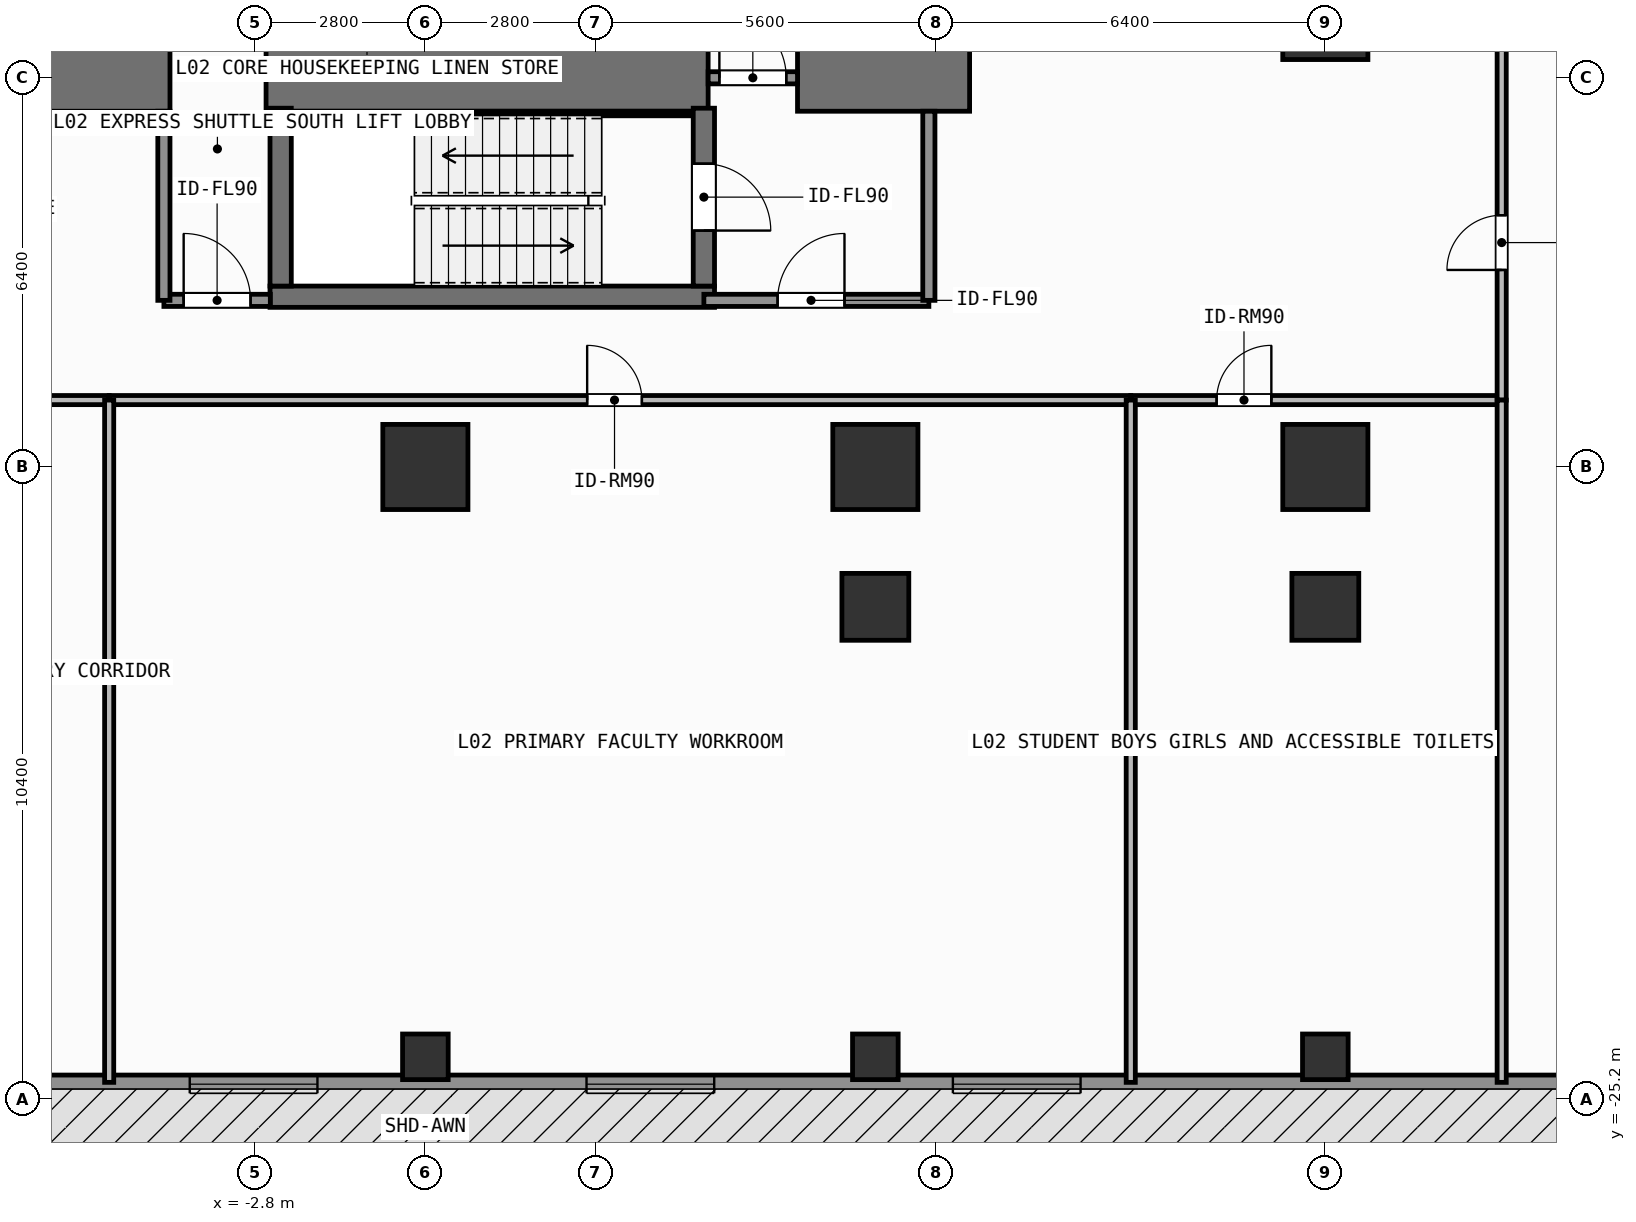
"""IFC4 building model, lengths in metres.
Left out: names, types, materials, properties, quantities, classifications, styles, units other than length and angle.
Written with IfcOpenShell. Run it as: python <this file> out.ifc"""

import sys

from ifc_helpers import new_model, si_unit, direction, frame, frame_2d, origin, origin_2d, place, context, subcontext, project, spatial, rectangle, extrude, element, fill, save


model = new_model("IFC4")
c1 = context("Model", 3, precision=1e-05, world=origin(), true_north=direction((0.0, 1.0)))
c2 = subcontext(c1, "Body", "Model", "MODEL_VIEW")
j1 = project(units=[si_unit("LENGTHUNIT", "METRE"), si_unit("PLANEANGLEUNIT", "RADIAN")], contexts=[c1])
p1 = place(None, origin())
s1 = spatial("IfcSite", under=j1, at=p1, CompositionType="ELEMENT")
p2 = place(p1, origin())
s2 = spatial("IfcBuilding", under=s1, at=p2, CompositionType="ELEMENT")
p3 = place(p2, frame((0.0, 0.0, 4.8)))
s3 = spatial("IfcBuildingStorey", under=s2, at=p3, CompositionType="ELEMENT", Elevation=4.8)
p4 = place(p3, frame((-7.55, -8.4, 0.0), z_axis=(0.0, 0.0, 1.0), x_axis=(1.0, 0.0, 0.0)))
e1 = element("IfcWall", 1, at=p4, inside=s3, PredefinedType="SHEAR", context=c2, shape_type="SweptSolid", body=[
    extrude(rectangle(XDim=3.35, YDim=1.1, at=frame_2d((1.675, 0.0))), origin(), (0.0, 0.0, 1.0), 4.2),
])
p5 = place(p3, frame((-2.62, -8.4, 0.0), z_axis=(0.0, 0.0, 1.0), x_axis=(1.0, 0.0, 0.0)))
e2 = element("IfcWall", 2, at=p5, inside=s3, PredefinedType="SHEAR", context=c2, shape_type="SweptSolid", body=[
    extrude(rectangle(XDim=7.27, YDim=1.1, at=frame_2d((3.635, 0.0))), origin(), (0.0, 0.0, 1.0), 4.2),
])
p6 = place(p3, frame((6.12, -8.4, 0.0), z_axis=(0.0, 0.0, 1.0), x_axis=(1.0, 0.0, 0.0)))
e3 = element("IfcWall", 3, at=p6, inside=s3, PredefinedType="SHEAR", context=c2, shape_type="SweptSolid", body=[
    extrude(rectangle(XDim=2.83, YDim=1.1, at=frame_2d((1.415, 0.0))), origin(), (0.0, 0.0, 1.0), 4.2),
])
p7 = place(p3, frame((-2.555, -12.0, 0.0), z_axis=(0.0, 0.0, 1.0), x_axis=(1.0, 0.0, 0.0)))
e4 = element("IfcWall", 4, at=p7, inside=s3, PredefinedType="SHEAR", context=c2, shape_type="SweptSolid", body=[
    extrude(rectangle(XDim=7.31, YDim=0.35, at=frame_2d((3.655, 0.0))), origin(), (0.0, 0.0, 1.0), 4.2),
])
p8 = place(p3, frame((-2.2, -8.988, 0.0), z_axis=(0.0, 0.0, 1.0), x_axis=(1.0, 0.0, 0.0)))
e5 = element("IfcWall", 5, at=p8, inside=s3, PredefinedType="SHEAR", context=c2, shape_type="SweptSolid", body=[
    extrude(rectangle(XDim=6.6, YDim=0.075, at=frame_2d((3.3, 0.0))), origin(), (0.0, 0.0, 1.0), 4.2),
])
p9 = place(p3, frame((-2.38, -11.825, 0.0), z_axis=(0.0, 0.0, 1.0), x_axis=(0.0, 1.0, 0.0)))
e6 = element("IfcWall", 6, at=p9, inside=s3, PredefinedType="SHEAR", context=c2, shape_type="SweptSolid", body=[
    extrude(rectangle(XDim=2.925, YDim=0.35, at=frame_2d((1.462, 0.0))), origin(), (0.0, 0.0, 1.0), 4.2),
])
p10 = place(p3, frame((4.58, -8.9, 0.0), z_axis=(0.0, 0.0, 1.0), x_axis=(0.0, -1.0, 0.0)))
e7 = element("IfcWall", 7, at=p10, inside=s3, PredefinedType="SHEAR", context=c2, shape_type="SweptSolid", body=[
    extrude(rectangle(XDim=2.925, YDim=0.35, at=frame_2d((1.462, 0.0))), origin(), (0.0, 0.0, 1.0), 4.2),
])
p11 = place(p10, frame((0.913, 0.0, 0.0)))
e8 = element("IfcOpeningElement", 8, at=p11, cuts=e7, PredefinedType="OPENING", context=c2, shape_type="SweptSolid", body=[
    extrude(rectangle(XDim=1.1, YDim=2.15, at=frame_2d((0.55, 1.075))), frame((0.0, 0.185, 0.0), z_axis=(0.0, -1.0, 0.0), x_axis=(1.0, 0.0, 0.0)), (0.0, 0.0, 1.0), 0.37),
])
for number, where, z_axis, x_axis in (
    (9, (0.0, -14.8, 0.0), (0.0, 0.0, 1.0), (1.0, 0.0, 0.0)),
    (10, (7.4, -14.8, 0.0), (0.0, 0.0, 1.0), (1.0, 0.0, 0.0)),
    (11, (14.8, -14.8, 0.0), (0.0, 0.0, 1.0), (1.0, 0.0, 0.0)),
    (12, (14.8, -7.4, 0.0), (0.0, 0.0, 1.0), (1.0, 0.0, 0.0)),
):
    element("IfcColumn", number, at=place(p3, frame(where, z_axis=z_axis, x_axis=x_axis)), inside=s3, PredefinedType="COLUMN", context=c2, shape_type="SweptSolid", body=[
        extrude(rectangle(XDim=1.4, YDim=1.4, at=origin_2d()), origin(), (0.0, 0.0, 1.0), 4.2),
    ])
for number, where, z_axis, x_axis in (
    (13, (7.4, -17.1, 0.0), (0.0, 0.0, 1.0), (1.0, 0.0, 0.0)),
    (14, (14.8, -17.1, 0.0), (0.0, 0.0, 1.0), (1.0, 0.0, 0.0)),
):
    element("IfcColumn", number, at=place(p3, frame(where, z_axis=z_axis, x_axis=x_axis)), inside=s3, PredefinedType="COLUMN", context=c2, shape_type="SweptSolid", body=[
        extrude(rectangle(XDim=1.1, YDim=1.1, at=origin_2d()), origin(), (0.0, 0.0, 1.0), 4.2),
    ])
for number, where, z_axis, x_axis in (
    (15, (0.0, -24.5, 0.0), (0.0, 0.0, 1.0), (1.0, 0.0, 0.0)),
    (16, (7.4, -24.5, 0.0), (0.0, 0.0, 1.0), (1.0, 0.0, 0.0)),
    (17, (14.8, -24.5, 0.0), (0.0, 0.0, 1.0), (1.0, 0.0, 0.0)),
):
    element("IfcColumn", number, at=place(p3, frame(where, z_axis=z_axis, x_axis=x_axis)), inside=s3, PredefinedType="COLUMN", context=c2, shape_type="SweptSolid", body=[
        extrude(rectangle(XDim=0.75, YDim=0.75, at=origin_2d()), origin(), (0.0, 0.0, 1.0), 4.2),
    ])
p12 = place(p3, frame((29.1, -24.95, 0.0), z_axis=(0.0, 0.0, 1.0), x_axis=(-1.0, 0.0, 0.0)))
e18 = element("IfcWall", 18, at=p12, inside=s3, PredefinedType="SOLIDWALL", context=c2, shape_type="SweptSolid", body=[
    extrude(rectangle(XDim=58.2, YDim=0.3, at=frame_2d((29.1, 0.0))), origin(), (0.0, 0.0, 1.0), 3.96),
])
p13 = place(p12, frame((39.15, 0.0, 0.85)))
e19 = element("IfcOpeningElement", 19, at=p13, cuts=e18, PredefinedType="OPENING", context=c2, shape_type="SweptSolid", body=[
    extrude(rectangle(XDim=2.1, YDim=2.2, at=frame_2d((1.05, 1.1))), frame((0.0, 0.16, 0.0), z_axis=(0.0, -1.0, 0.0), x_axis=(1.0, 0.0, 0.0)), (0.0, 0.0, 1.0), 0.32),
])
p14 = place(p12, frame((30.875, 0.0, 0.85)))
e20 = element("IfcOpeningElement", 20, at=p14, cuts=e18, PredefinedType="OPENING", context=c2, shape_type="SweptSolid", body=[
    extrude(rectangle(XDim=2.1, YDim=2.2, at=frame_2d((1.05, 1.1))), frame((0.0, 0.16, 0.0), z_axis=(0.0, -1.0, 0.0), x_axis=(1.0, 0.0, 0.0)), (0.0, 0.0, 1.0), 0.32),
])
p15 = place(p12, frame((24.35, 0.0, 0.85)))
e21 = element("IfcOpeningElement", 21, at=p15, cuts=e18, PredefinedType="OPENING", context=c2, shape_type="SweptSolid", body=[
    extrude(rectangle(XDim=2.1, YDim=2.2, at=frame_2d((1.05, 1.1))), frame((0.0, 0.16, 0.0), z_axis=(0.0, -1.0, 0.0), x_axis=(1.0, 0.0, 0.0)), (0.0, 0.0, 1.0), 0.32),
])
p16 = place(p12, frame((18.325, 0.0, 0.85)))
e22 = element("IfcOpeningElement", 22, at=p16, cuts=e18, PredefinedType="OPENING", context=c2, shape_type="SweptSolid", body=[
    extrude(rectangle(XDim=2.1, YDim=2.2, at=frame_2d((1.05, 1.1))), frame((0.0, 0.16, 0.0), z_axis=(0.0, -1.0, 0.0), x_axis=(1.0, 0.0, 0.0)), (0.0, 0.0, 1.0), 0.32),
])
p17 = place(p12, frame((6.483, 0.0, 0.85)))
e23 = element("IfcOpeningElement", 23, at=p17, cuts=e18, PredefinedType="OPENING", context=c2, shape_type="SweptSolid", body=[
    extrude(rectangle(XDim=2.1, YDim=2.2, at=frame_2d((1.05, 1.1))), frame((0.0, 0.16, 0.0), z_axis=(0.0, -1.0, 0.0), x_axis=(1.0, 0.0, 0.0)), (0.0, 0.0, 1.0), 0.32),
])
p18 = place(p3, frame((4.58, -12.06, 0.0), z_axis=(0.0, 0.0, 1.0), x_axis=(1.0, 0.0, 0.0)))
e24 = element("IfcWall", 24, at=p18, inside=s3, PredefinedType="SOLIDWALL", context=c2, shape_type="SweptSolid", body=[
    extrude(rectangle(XDim=3.7, YDim=0.2, at=frame_2d((1.85, 0.0))), origin(), (0.0, 0.0, 1.0), 3.96),
])
p19 = place(p18, frame((1.212, 0.0, 0.0)))
e25 = element("IfcOpeningElement", 25, at=p19, cuts=e24, PredefinedType="OPENING", context=c2, shape_type="SweptSolid", body=[
    extrude(rectangle(XDim=1.1, YDim=2.15, at=frame_2d((0.55, 1.075))), frame((0.0, 0.11, 0.0), z_axis=(0.0, -1.0, 0.0), x_axis=(1.0, 0.0, 0.0)), (0.0, 0.0, 1.0), 0.22),
])
p20 = place(p3, frame((4.65, -8.4, 0.0), z_axis=(0.0, 0.0, 1.0), x_axis=(1.0, 0.0, 0.0)))
e26 = element("IfcWall", 26, at=p20, inside=s3, PredefinedType="SOLIDWALL", context=c2, shape_type="SweptSolid", body=[
    extrude(rectangle(XDim=1.47, YDim=0.2, at=frame_2d((0.735, 0.0))), origin(), (0.0, 0.0, 1.0), 3.0),
])
p21 = place(p20, frame((0.185, 0.0, 0.0)))
e27 = element("IfcOpeningElement", 27, at=p21, cuts=e26, PredefinedType="OPENING", context=c2, shape_type="SweptSolid", body=[
    extrude(rectangle(XDim=1.1, YDim=2.15, at=frame_2d((0.55, 1.075))), frame((0.0, 0.11, 0.0), z_axis=(0.0, -1.0, 0.0), x_axis=(1.0, 0.0, 0.0)), (0.0, 0.0, 1.0), 0.22),
])
p22 = place(p3, frame((-4.3, -12.06, 0.0), z_axis=(0.0, 0.0, 1.0), x_axis=(1.0, 0.0, 0.0)))
e28 = element("IfcWall", 28, at=p22, inside=s3, PredefinedType="SOLIDWALL", context=c2, shape_type="SweptSolid", body=[
    extrude(rectangle(XDim=1.75, YDim=0.2, at=frame_2d((0.875, 0.0))), origin(), (0.0, 0.0, 1.0), 3.96),
])
p23 = place(p22, frame((0.325, 0.0, 0.0)))
e29 = element("IfcOpeningElement", 29, at=p23, cuts=e28, PredefinedType="OPENING", context=c2, shape_type="SweptSolid", body=[
    extrude(rectangle(XDim=1.1, YDim=2.15, at=frame_2d((0.55, 1.075))), frame((0.0, 0.11, 0.0), z_axis=(0.0, -1.0, 0.0), x_axis=(1.0, 0.0, 0.0)), (0.0, 0.0, 1.0), 0.22),
])
p24 = place(p3, frame((-18.5, -13.7, 0.0), z_axis=(0.0, 0.0, 1.0), x_axis=(1.0, 0.0, 0.0)))
e30 = element("IfcWall", 30, at=p24, inside=s3, PredefinedType="PARTITIONING", context=c2, shape_type="SweptSolid", body=[
    extrude(rectangle(XDim=13.3, YDim=0.15, at=frame_2d((6.65, 0.0))), origin(), (0.0, 0.0, 1.0), 3.96),
])
p25 = place(p24, frame((6.2, 0.0, 0.0)))
e31 = element("IfcOpeningElement", 31, at=p25, cuts=e30, PredefinedType="OPENING", context=c2, shape_type="SweptSolid", body=[
    extrude(rectangle(XDim=0.9, YDim=2.1, at=frame_2d((0.45, 1.05))), frame((0.0, 0.085, 0.0), z_axis=(0.0, -1.0, 0.0), x_axis=(1.0, 0.0, 0.0)), (0.0, 0.0, 1.0), 0.17),
])
p26 = place(p3, frame((-5.2, -13.7, 0.0), z_axis=(0.0, 0.0, 1.0), x_axis=(1.0, 0.0, 0.0)))
e32 = element("IfcWall", 32, at=p26, inside=s3, PredefinedType="PARTITIONING", context=c2, shape_type="SweptSolid", body=[
    extrude(rectangle(XDim=16.8, YDim=0.15, at=frame_2d((8.4, 0.0))), origin(), (0.0, 0.0, 1.0), 3.96),
])
p27 = place(p26, frame((7.861, 0.0, 0.0)))
e33 = element("IfcOpeningElement", 33, at=p27, cuts=e32, PredefinedType="OPENING", context=c2, shape_type="SweptSolid", body=[
    extrude(rectangle(XDim=0.9, YDim=2.1, at=frame_2d((0.45, 1.05))), frame((0.0, 0.085, 0.0), z_axis=(0.0, -1.0, 0.0), x_axis=(1.0, 0.0, 0.0)), (0.0, 0.0, 1.0), 0.17),
])
p28 = place(p3, frame((11.6, -13.7, 0.0), z_axis=(0.0, 0.0, 1.0), x_axis=(1.0, 0.0, 0.0)))
e34 = element("IfcWall", 34, at=p28, inside=s3, PredefinedType="PARTITIONING", context=c2, shape_type="SweptSolid", body=[
    extrude(rectangle(XDim=6.05, YDim=0.15, at=frame_2d((3.025, 0.0))), origin(), (0.0, 0.0, 1.0), 3.96),
])
p29 = place(p28, frame((1.412, 0.0, 0.0)))
e35 = element("IfcOpeningElement", 35, at=p29, cuts=e34, PredefinedType="OPENING", context=c2, shape_type="SweptSolid", body=[
    extrude(rectangle(XDim=0.9, YDim=2.1, at=frame_2d((0.45, 1.05))), frame((0.0, 0.085, 0.0), z_axis=(0.0, -1.0, 0.0), x_axis=(1.0, 0.0, 0.0)), (0.0, 0.0, 1.0), 0.17),
])
p30 = place(p3, frame((17.7, -13.7, 0.0), z_axis=(0.0, 0.0, 1.0), x_axis=(0.0, 1.0, 0.0)))
e36 = element("IfcWall", 36, at=p30, inside=s3, PredefinedType="PARTITIONING", context=c2, shape_type="SweptSolid", body=[
    extrude(rectangle(XDim=6.8, YDim=0.15, at=frame_2d((3.4, 0.0))), origin(), (0.0, 0.0, 1.0), 3.96),
])
p31 = place(p30, frame((2.14, 0.0, 0.0)))
e37 = element("IfcOpeningElement", 37, at=p31, cuts=e36, PredefinedType="OPENING", context=c2, shape_type="SweptSolid", body=[
    extrude(rectangle(XDim=0.9, YDim=2.1, at=frame_2d((0.45, 1.05))), frame((0.0, 0.085, 0.0), z_axis=(0.0, -1.0, 0.0), x_axis=(1.0, 0.0, 0.0)), (0.0, 0.0, 1.0), 0.17),
])
for number, where, z_axis, x_axis in (
    (38, (8.28, -12.06, 0.0), (0.0, 0.0, 1.0), (0.0, 1.0, 0.0)),
    (39, (-4.3, -12.06, 0.0), (0.0, 0.0, 1.0), (0.0, 1.0, 0.0)),
):
    element("IfcWall", number, at=place(p3, frame(where, z_axis=z_axis, x_axis=x_axis)), inside=s3, PredefinedType="SOLIDWALL", context=c2, shape_type="SweptSolid", body=[
        extrude(rectangle(XDim=3.11, YDim=0.2, at=frame_2d((1.555, 0.0))), origin(), (0.0, 0.0, 1.0), 3.96),
    ])
for number, where, z_axis, x_axis in (
    (40, (-5.2, -24.92, 0.0), (0.0, 0.0, 1.0), (0.0, 1.0, 0.0)),
    (41, (11.6, -24.92, 0.0), (0.0, 0.0, 1.0), (0.0, 1.0, 0.0)),
    (42, (17.7, -13.7, 0.0), (0.0, 0.0, 1.0), (0.0, -1.0, 0.0)),
):
    element("IfcWall", number, at=place(p3, frame(where, z_axis=z_axis, x_axis=x_axis)), inside=s3, PredefinedType="PARTITIONING", context=c2, shape_type="SweptSolid", body=[
        extrude(rectangle(XDim=11.22, YDim=0.15, at=frame_2d((5.61, 0.0))), origin(), (0.0, 0.0, 1.0), 3.96),
    ])
p32 = place(p14, origin())
e43 = element("IfcWindow", 43, at=p32, inside=s3, PartitioningType="SINGLE_PANEL", PredefinedType="WINDOW", context=c2, shape_type="SweptSolid", body=[
    extrude(rectangle(XDim=2.1, YDim=2.2, at=frame_2d((1.05, 1.1))), frame((0.0, 0.03, 0.0), z_axis=(0.0, -1.0, 0.0), x_axis=(1.0, 0.0, 0.0)), (0.0, 0.0, 1.0), 0.06),
])
fill(e20, e43)
p33 = place(p15, origin())
e44 = element("IfcWindow", 44, at=p33, inside=s3, PartitioningType="SINGLE_PANEL", PredefinedType="WINDOW", context=c2, shape_type="SweptSolid", body=[
    extrude(rectangle(XDim=2.1, YDim=2.2, at=frame_2d((1.05, 1.1))), frame((0.0, 0.03, 0.0), z_axis=(0.0, -1.0, 0.0), x_axis=(1.0, 0.0, 0.0)), (0.0, 0.0, 1.0), 0.06),
])
fill(e21, e44)
p34 = place(p16, origin())
e45 = element("IfcWindow", 45, at=p34, inside=s3, PartitioningType="SINGLE_PANEL", PredefinedType="WINDOW", context=c2, shape_type="SweptSolid", body=[
    extrude(rectangle(XDim=2.1, YDim=2.2, at=frame_2d((1.05, 1.1))), frame((0.0, 0.03, 0.0), z_axis=(0.0, -1.0, 0.0), x_axis=(1.0, 0.0, 0.0)), (0.0, 0.0, 1.0), 0.06),
])
fill(e22, e45)
p35 = place(p11, origin())
e46 = element("IfcDoor", 46, at=p35, inside=s3, OperationType="SINGLE_SWING_RIGHT", PredefinedType="DOOR", context=c2, shape_type="SweptSolid", body=[
    extrude(rectangle(XDim=1.1, YDim=2.15, at=frame_2d((0.55, 1.075))), frame((0.0, 0.025, 0.0), z_axis=(0.0, -1.0, 0.0), x_axis=(1.0, 0.0, 0.0)), (0.0, 0.0, 1.0), 0.05),
])
fill(e8, e46)
p36 = place(p19, origin())
e47 = element("IfcDoor", 47, at=p36, inside=s3, OperationType="SINGLE_SWING_RIGHT", PredefinedType="DOOR", context=c2, shape_type="SweptSolid", body=[
    extrude(rectangle(XDim=1.1, YDim=2.15, at=frame_2d((0.55, 1.075))), frame((0.0, 0.025, 0.0), z_axis=(0.0, -1.0, 0.0), x_axis=(1.0, 0.0, 0.0)), (0.0, 0.0, 1.0), 0.05),
])
fill(e25, e47)
p37 = place(p21, origin())
e48 = element("IfcDoor", 48, at=p37, inside=s3, OperationType="SINGLE_SWING_LEFT", PredefinedType="DOOR", context=c2, shape_type="SweptSolid", body=[
    extrude(rectangle(XDim=1.1, YDim=2.15, at=frame_2d((0.55, 1.075))), frame((0.0, 0.025, 0.0), z_axis=(0.0, -1.0, 0.0), x_axis=(1.0, 0.0, 0.0)), (0.0, 0.0, 1.0), 0.05),
])
fill(e27, e48)
p38 = place(p23, origin())
e49 = element("IfcDoor", 49, at=p38, inside=s3, OperationType="SINGLE_SWING_LEFT", PredefinedType="DOOR", context=c2, shape_type="SweptSolid", body=[
    extrude(rectangle(XDim=1.1, YDim=2.15, at=frame_2d((0.55, 1.075))), frame((0.0, 0.025, 0.0), z_axis=(0.0, -1.0, 0.0), x_axis=(1.0, 0.0, 0.0)), (0.0, 0.0, 1.0), 0.05),
])
fill(e29, e49)
p39 = place(p27, origin())
e50 = element("IfcDoor", 50, at=p39, inside=s3, OperationType="SINGLE_SWING_LEFT", PredefinedType="DOOR", context=c2, shape_type="SweptSolid", body=[
    extrude(rectangle(XDim=0.9, YDim=2.1, at=frame_2d((0.45, 1.05))), frame((0.0, 0.025, 0.0), z_axis=(0.0, -1.0, 0.0), x_axis=(1.0, 0.0, 0.0)), (0.0, 0.0, 1.0), 0.05),
])
fill(e33, e50)
p40 = place(p29, origin())
e51 = element("IfcDoor", 51, at=p40, inside=s3, OperationType="SINGLE_SWING_RIGHT", PredefinedType="DOOR", context=c2, shape_type="SweptSolid", body=[
    extrude(rectangle(XDim=0.9, YDim=2.1, at=frame_2d((0.45, 1.05))), frame((0.0, 0.025, 0.0), z_axis=(0.0, -1.0, 0.0), x_axis=(1.0, 0.0, 0.0)), (0.0, 0.0, 1.0), 0.05),
])
fill(e35, e51)
p41 = place(p31, origin())
e52 = element("IfcDoor", 52, at=p41, inside=s3, OperationType="SINGLE_SWING_LEFT", PredefinedType="DOOR", context=c2, shape_type="SweptSolid", body=[
    extrude(rectangle(XDim=0.9, YDim=2.1, at=frame_2d((0.45, 1.05))), frame((0.0, 0.025, 0.0), z_axis=(0.0, -1.0, 0.0), x_axis=(1.0, 0.0, 0.0)), (0.0, 0.0, 1.0), 0.05),
])
fill(e37, e52)
save(model, sys.argv[1])
